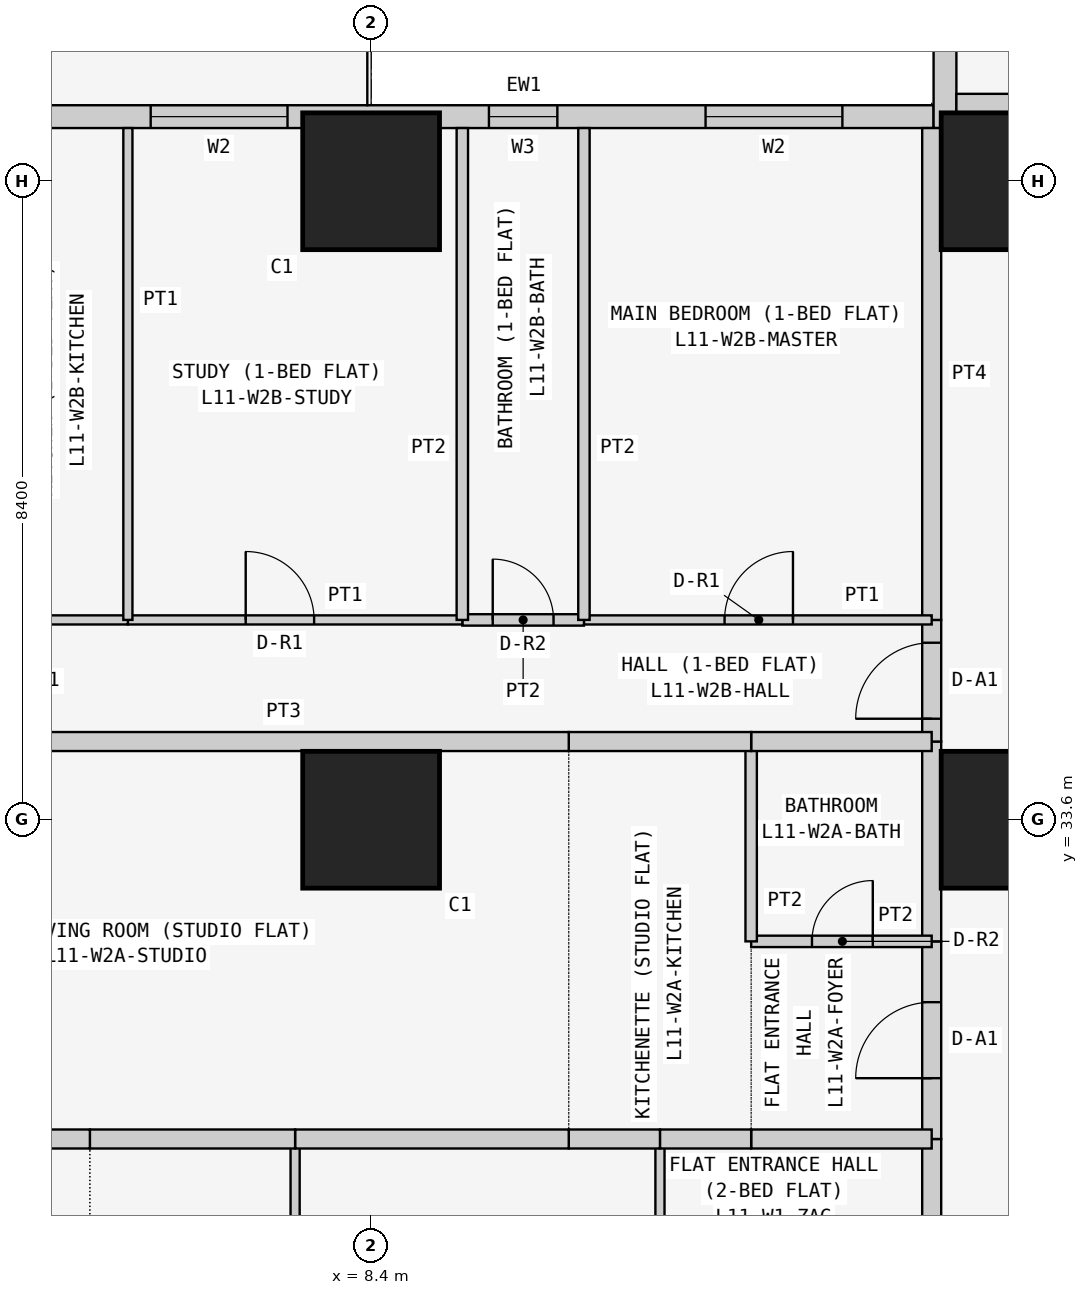
"""IFC4 building model, lengths in metres.
Left out: names, types, materials, properties, quantities, classifications, styles, units other than length and angle.
Written with IfcOpenShell. Run it as: python <this file> out.ifc"""

import sys

from ifc_helpers import new_model, si_unit, direction, frame, frame_2d, origin, origin_2d, place, context, subcontext, project, spatial, rectangle, extrude, element, fill, save


model = new_model("IFC4")
c1 = context("Model", 3, precision=1e-05, world=origin(), true_north=direction((0.0, 1.0)))
c2 = subcontext(c1, "Body", "Model", "MODEL_VIEW")
j1 = project(units=[si_unit("LENGTHUNIT", "METRE"), si_unit("PLANEANGLEUNIT", "RADIAN")], contexts=[c1])
p1 = place(None, origin())
s1 = spatial("IfcSite", under=j1, at=p1, CompositionType="ELEMENT")
p2 = place(p1, origin())
s2 = spatial("IfcBuilding", under=s1, at=p2, CompositionType="ELEMENT")
p3 = place(p2, frame((0.0, 0.0, 48.9)))
s3 = spatial("IfcBuildingStorey", under=s2, at=p3, CompositionType="ELEMENT", Elevation=48.9)
for number, where, z_axis, x_axis in (
    (1, (8.4, 33.6, 0.0), (0.0, 0.0, 1.0), (1.0, 0.0, 0.0)),
    (2, (8.4, 42.0, 0.0), (0.0, 0.0, 1.0), (1.0, 0.0, 0.0)),
    (3, (16.8, 33.6, 0.0), (0.0, 0.0, 1.0), (1.0, 0.0, 0.0)),
    (4, (16.8, 42.0, 0.0), (0.0, 0.0, 1.0), (1.0, 0.0, 0.0)),
):
    element("IfcColumn", number, at=place(p3, frame(where, z_axis=z_axis, x_axis=x_axis)), inside=s3, PredefinedType="COLUMN", context=c2, shape_type="SweptSolid", body=[
        extrude(rectangle(XDim=1.8, YDim=1.8, at=origin_2d()), origin(), (0.0, 0.0, 1.0), 3.6),
    ])
p4 = place(p3, frame((15.8, 42.85, 0.0), z_axis=(0.0, 0.0, 1.0), x_axis=(-1.0, 0.0, 0.0)))
e5 = element("IfcWall", 5, at=p4, inside=s3, PredefinedType="SOLIDWALL", context=c2, shape_type="SweptSolid", body=[
    extrude(rectangle(XDim=15.4, YDim=0.3, at=frame_2d((7.7, 0.0))), origin(), (0.0, 0.0, 1.0), 3.45),
])
p5 = place(p4, frame((1.2, 0.0, 0.9)))
e6 = element("IfcOpeningElement", 6, at=p5, cuts=e5, PredefinedType="OPENING", context=c2, shape_type="SweptSolid", body=[
    extrude(rectangle(XDim=1.8, YDim=1.5, at=frame_2d((0.9, 0.75))), frame((0.0, 0.16, 0.0), z_axis=(0.0, -1.0, 0.0), x_axis=(1.0, 0.0, 0.0)), (0.0, 0.0, 1.0), 0.32),
])
p6 = place(p4, frame((4.95, 0.0, 1.5)))
e7 = element("IfcOpeningElement", 7, at=p6, cuts=e5, PredefinedType="OPENING", context=c2, shape_type="SweptSolid", body=[
    extrude(rectangle(XDim=0.9, YDim=0.7, at=frame_2d((0.45, 0.35))), frame((0.0, 0.16, 0.0), z_axis=(0.0, -1.0, 0.0), x_axis=(1.0, 0.0, 0.0)), (0.0, 0.0, 1.0), 0.32),
])
p7 = place(p4, frame((8.5, 0.0, 0.9)))
e8 = element("IfcOpeningElement", 8, at=p7, cuts=e5, PredefinedType="OPENING", context=c2, shape_type="SweptSolid", body=[
    extrude(rectangle(XDim=1.8, YDim=1.5, at=frame_2d((0.9, 0.75))), frame((0.0, 0.16, 0.0), z_axis=(0.0, -1.0, 0.0), x_axis=(1.0, 0.0, 0.0)), (0.0, 0.0, 1.0), 0.32),
])
p8 = place(p4, frame((12.5, 0.0, 0.0)))
e9 = element("IfcOpeningElement", 9, at=p8, cuts=e5, PredefinedType="OPENING", context=c2, shape_type="SweptSolid", body=[
    extrude(rectangle(XDim=0.9, YDim=2.4, at=frame_2d((0.45, 1.2))), frame((0.0, 0.16, 0.0), z_axis=(0.0, -1.0, 0.0), x_axis=(1.0, 0.0, 0.0)), (0.0, 0.0, 1.0), 0.32),
])
p9 = place(p4, frame((13.5, 0.0, 0.9)))
e10 = element("IfcOpeningElement", 10, at=p9, cuts=e5, PredefinedType="OPENING", context=c2, shape_type="SweptSolid", body=[
    extrude(rectangle(XDim=1.2, YDim=1.5, at=frame_2d((0.6, 0.75))), frame((0.0, 0.16, 0.0), z_axis=(0.0, -1.0, 0.0), x_axis=(1.0, 0.0, 0.0)), (0.0, 0.0, 1.0), 0.32),
])
p10 = place(p3, frame((15.95, 58.4, 0.0), z_axis=(0.0, 0.0, 1.0), x_axis=(0.0, -1.0, 0.0)))
e11 = element("IfcWall", 11, at=p10, inside=s3, PredefinedType="SOLIDWALL", context=c2, shape_type="SweptSolid", body=[
    extrude(rectangle(XDim=15.7, YDim=0.3, at=frame_2d((7.85, 0.0))), origin(), (0.0, 0.0, 1.0), 3.45),
])
p11 = place(p10, frame((12.4, 0.0, 0.9)))
e12 = element("IfcOpeningElement", 12, at=p11, cuts=e11, PredefinedType="OPENING", context=c2, shape_type="SweptSolid", body=[
    extrude(rectangle(XDim=1.8, YDim=1.5, at=frame_2d((0.9, 0.75))), frame((0.0, 0.16, 0.0), z_axis=(0.0, -1.0, 0.0), x_axis=(1.0, 0.0, 0.0)), (0.0, 0.0, 1.0), 0.32),
])
p12 = place(p10, frame((9.55, 0.0, 1.5)))
e13 = element("IfcOpeningElement", 13, at=p12, cuts=e11, PredefinedType="OPENING", context=c2, shape_type="SweptSolid", body=[
    extrude(rectangle(XDim=0.9, YDim=0.7, at=frame_2d((0.45, 0.35))), frame((0.0, 0.16, 0.0), z_axis=(0.0, -1.0, 0.0), x_axis=(1.0, 0.0, 0.0)), (0.0, 0.0, 1.0), 0.32),
])
p13 = place(p10, frame((5.1, 0.0, 0.9)))
e14 = element("IfcOpeningElement", 14, at=p13, cuts=e11, PredefinedType="OPENING", context=c2, shape_type="SweptSolid", body=[
    extrude(rectangle(XDim=1.8, YDim=1.5, at=frame_2d((0.9, 0.75))), frame((0.0, 0.16, 0.0), z_axis=(0.0, -1.0, 0.0), x_axis=(1.0, 0.0, 0.0)), (0.0, 0.0, 1.0), 0.32),
])
p14 = place(p10, frame((2.0, 0.0, 0.0)))
e15 = element("IfcOpeningElement", 15, at=p14, cuts=e11, PredefinedType="OPENING", context=c2, shape_type="SweptSolid", body=[
    extrude(rectangle(XDim=0.9, YDim=2.4, at=frame_2d((0.45, 1.2))), frame((0.0, 0.16, 0.0), z_axis=(0.0, -1.0, 0.0), x_axis=(1.0, 0.0, 0.0)), (0.0, 0.0, 1.0), 0.32),
])
p15 = place(p10, frame((0.7, 0.0, 0.9)))
e16 = element("IfcOpeningElement", 16, at=p15, cuts=e11, PredefinedType="OPENING", context=c2, shape_type="SweptSolid", body=[
    extrude(rectangle(XDim=1.2, YDim=1.5, at=frame_2d((0.6, 0.75))), frame((0.0, 0.16, 0.0), z_axis=(0.0, -1.0, 0.0), x_axis=(1.0, 0.0, 0.0)), (0.0, 0.0, 1.0), 0.32),
])
p16 = place(p3, frame((16.1, 43.025, 0.0), z_axis=(0.0, 0.0, 1.0), x_axis=(1.0, 0.0, 0.0)))
e17 = element("IfcWall", 17, at=p16, inside=s3, PredefinedType="PARTITIONING", context=c2, shape_type="SweptSolid", body=[
    extrude(rectangle(XDim=6.871, YDim=0.25, at=frame_2d((3.436, 0.0))), origin(), (0.0, 0.0, 1.0), 3.45),
])
p17 = place(p3, frame((15.775, 24.171, 0.0), z_axis=(0.0, 0.0, 1.0), x_axis=(0.0, 1.0, 0.0)))
e18 = element("IfcWall", 18, at=p17, inside=s3, PredefinedType="PARTITIONING", context=c2, shape_type="SweptSolid", body=[
    extrude(rectangle(XDim=5.229, YDim=0.25, at=frame_2d((2.615, 0.0))), origin(), (0.0, 0.0, 1.0), 3.45),
])
p18 = place(p17, frame((2.129, 0.0, 0.0)))
e19 = element("IfcOpeningElement", 19, at=p18, cuts=e18, PredefinedType="OPENING", context=c2, shape_type="SweptSolid", body=[
    extrude(rectangle(XDim=1.0, YDim=2.1, at=frame_2d((0.5, 1.05))), frame((0.0, 0.135, 0.0), z_axis=(0.0, -1.0, 0.0), x_axis=(1.0, 0.0, 0.0)), (0.0, 0.0, 1.0), 0.27),
])
p19 = place(p3, frame((15.775, 29.4, 0.0), z_axis=(0.0, 0.0, 1.0), x_axis=(0.0, 1.0, 0.0)))
e20 = element("IfcWall", 20, at=p19, inside=s3, PredefinedType="PARTITIONING", context=c2, shape_type="SweptSolid", body=[
    extrude(rectangle(XDim=2.6, YDim=0.25, at=frame_2d((1.3, 0.0))), origin(), (0.0, 0.0, 1.0), 3.45),
])
p20 = place(p19, frame((0.8, 0.0, 0.0)))
e21 = element("IfcOpeningElement", 21, at=p20, cuts=e20, PredefinedType="OPENING", context=c2, shape_type="SweptSolid", body=[
    extrude(rectangle(XDim=1.0, YDim=2.1, at=frame_2d((0.5, 1.05))), frame((0.0, 0.135, 0.0), z_axis=(0.0, -1.0, 0.0), x_axis=(1.0, 0.0, 0.0)), (0.0, 0.0, 1.0), 0.27),
])
p21 = place(p3, frame((15.775, 32.0, 0.0), z_axis=(0.0, 0.0, 1.0), x_axis=(0.0, 1.0, 0.0)))
e22 = element("IfcWall", 22, at=p21, inside=s3, PredefinedType="PARTITIONING", context=c2, shape_type="SweptSolid", body=[
    extrude(rectangle(XDim=2.629, YDim=0.25, at=frame_2d((1.314, 0.0))), origin(), (0.0, 0.0, 1.0), 3.45),
])
p22 = place(p3, frame((15.775, 34.629, 0.0), z_axis=(0.0, 0.0, 1.0), x_axis=(0.0, 1.0, 0.0)))
e23 = element("IfcWall", 23, at=p22, inside=s3, PredefinedType="PARTITIONING", context=c2, shape_type="SweptSolid", body=[
    extrude(rectangle(XDim=1.6, YDim=0.25, at=frame_2d((0.8, 0.0))), origin(), (0.0, 0.0, 1.0), 3.45),
])
p23 = place(p22, frame((0.3, 0.0, 0.0)))
e24 = element("IfcOpeningElement", 24, at=p23, cuts=e23, PredefinedType="OPENING", context=c2, shape_type="SweptSolid", body=[
    extrude(rectangle(XDim=1.0, YDim=2.1, at=frame_2d((0.5, 1.05))), frame((0.0, 0.135, 0.0), z_axis=(0.0, -1.0, 0.0), x_axis=(1.0, 0.0, 0.0)), (0.0, 0.0, 1.0), 0.27),
])
p24 = place(p3, frame((15.775, 36.229, 0.0), z_axis=(0.0, 0.0, 1.0), x_axis=(0.0, 1.0, 0.0)))
e25 = element("IfcWall", 25, at=p24, inside=s3, PredefinedType="PARTITIONING", context=c2, shape_type="SweptSolid", body=[
    extrude(rectangle(XDim=6.471, YDim=0.25, at=frame_2d((3.235, 0.0))), origin(), (0.0, 0.0, 1.0), 3.45),
])
p25 = place(p3, frame((12.2, 29.4, 0.0), z_axis=(0.0, 0.0, 1.0), x_axis=(0.0, -1.0, 0.0)))
e26 = element("IfcWall", 26, at=p25, inside=s3, PredefinedType="PARTITIONING", context=c2, shape_type="SweptSolid", body=[
    extrude(rectangle(XDim=5.229, YDim=0.12, at=frame_2d((2.615, 0.0))), origin(), (0.0, 0.0, 1.0), 3.45),
])
p26 = place(p3, frame((15.775, 29.4, 0.0), z_axis=(0.0, 0.0, 1.0), x_axis=(-1.0, 0.0, 0.0)))
e27 = element("IfcWall", 27, at=p26, inside=s3, PredefinedType="PARTITIONING", context=c2, shape_type="SweptSolid", body=[
    extrude(rectangle(XDim=2.375, YDim=0.25, at=frame_2d((1.188, 0.0))), origin(), (0.0, 0.0, 1.0), 3.45),
])
p27 = place(p3, frame((13.4, 29.4, 0.0), z_axis=(0.0, 0.0, 1.0), x_axis=(-1.0, 0.0, 0.0)))
e28 = element("IfcWall", 28, at=p27, inside=s3, PredefinedType="PARTITIONING", context=c2, shape_type="SweptSolid", body=[
    extrude(rectangle(XDim=1.2, YDim=0.25, at=frame_2d((0.6, 0.0))), origin(), (0.0, 0.0, 1.0), 3.45),
])
p28 = place(p3, frame((7.4, 29.4, 0.0), z_axis=(0.0, 0.0, 1.0), x_axis=(0.0, -1.0, 0.0)))
e29 = element("IfcWall", 29, at=p28, inside=s3, PredefinedType="PARTITIONING", context=c2, shape_type="SweptSolid", body=[
    extrude(rectangle(XDim=5.229, YDim=0.12, at=frame_2d((2.615, 0.0))), origin(), (0.0, 0.0, 1.0), 3.45),
])
p29 = place(p3, frame((12.2, 29.4, 0.0), z_axis=(0.0, 0.0, 1.0), x_axis=(-1.0, 0.0, 0.0)))
e30 = element("IfcWall", 30, at=p29, inside=s3, PredefinedType="PARTITIONING", context=c2, shape_type="SweptSolid", body=[
    extrude(rectangle(XDim=1.2, YDim=0.25, at=frame_2d((0.6, 0.0))), origin(), (0.0, 0.0, 1.0), 3.45),
])
p30 = place(p3, frame((11.0, 29.4, 0.0), z_axis=(0.0, 0.0, 1.0), x_axis=(-1.0, 0.0, 0.0)))
e31 = element("IfcWall", 31, at=p30, inside=s3, PredefinedType="PARTITIONING", context=c2, shape_type="SweptSolid", body=[
    extrude(rectangle(XDim=3.6, YDim=0.25, at=frame_2d((1.8, 0.0))), origin(), (0.0, 0.0, 1.0), 3.45),
])
p31 = place(p3, frame((7.4, 29.4, 0.0), z_axis=(0.0, 0.0, 1.0), x_axis=(-1.0, 0.0, 0.0)))
e32 = element("IfcWall", 32, at=p31, inside=s3, PredefinedType="PARTITIONING", context=c2, shape_type="SweptSolid", body=[
    extrude(rectangle(XDim=2.7, YDim=0.25, at=frame_2d((1.35, 0.0))), origin(), (0.0, 0.0, 1.0), 3.45),
])
p32 = place(p3, frame((4.7, 29.4, 0.0), z_axis=(0.0, 0.0, 1.0), x_axis=(-1.0, 0.0, 0.0)))
e33 = element("IfcWall", 33, at=p32, inside=s3, PredefinedType="PARTITIONING", context=c2, shape_type="SweptSolid", body=[
    extrude(rectangle(XDim=5.35, YDim=0.25, at=frame_2d((2.675, 0.0))), origin(), (0.0, 0.0, 1.0), 3.45),
])
p33 = place(p3, frame((13.4, 32.0, 0.0), z_axis=(0.0, 0.0, 1.0), x_axis=(1.0, 0.0, 0.0)))
e34 = element("IfcWall", 34, at=p33, inside=s3, PredefinedType="PARTITIONING", context=c2, shape_type="SweptSolid", body=[
    extrude(rectangle(XDim=2.375, YDim=0.15, at=frame_2d((1.188, 0.0))), origin(), (0.0, 0.0, 1.0), 3.45),
])
p34 = place(p33, frame((0.8, 0.0, 0.0)))
e35 = element("IfcOpeningElement", 35, at=p34, cuts=e34, PredefinedType="OPENING", context=c2, shape_type="SweptSolid", body=[
    extrude(rectangle(XDim=0.8, YDim=2.1, at=frame_2d((0.4, 1.05))), frame((0.0, 0.085, 0.0), z_axis=(0.0, -1.0, 0.0), x_axis=(1.0, 0.0, 0.0)), (0.0, 0.0, 1.0), 0.17),
])
p35 = place(p3, frame((13.4, 32.0, 0.0), z_axis=(0.0, 0.0, 1.0), x_axis=(0.0, 1.0, 0.0)))
e36 = element("IfcWall", 36, at=p35, inside=s3, PredefinedType="PARTITIONING", context=c2, shape_type="SweptSolid", body=[
    extrude(rectangle(XDim=2.629, YDim=0.15, at=frame_2d((1.314, 0.0))), origin(), (0.0, 0.0, 1.0), 3.45),
])
p36 = place(p3, frame((13.4, 34.629, 0.0), z_axis=(0.0, 0.0, 1.0), x_axis=(1.0, 0.0, 0.0)))
e37 = element("IfcWall", 37, at=p36, inside=s3, PredefinedType="PARTITIONING", context=c2, shape_type="SweptSolid", body=[
    extrude(rectangle(XDim=2.375, YDim=0.25, at=frame_2d((1.188, 0.0))), origin(), (0.0, 0.0, 1.0), 3.45),
])
p37 = place(p3, frame((11.0, 34.629, 0.0), z_axis=(0.0, 0.0, 1.0), x_axis=(1.0, 0.0, 0.0)))
e38 = element("IfcWall", 38, at=p37, inside=s3, PredefinedType="PARTITIONING", context=c2, shape_type="SweptSolid", body=[
    extrude(rectangle(XDim=2.4, YDim=0.25, at=frame_2d((1.2, 0.0))), origin(), (0.0, 0.0, 1.0), 3.45),
])
p38 = place(p3, frame((3.5, 34.629, 0.0), z_axis=(0.0, 0.0, 1.0), x_axis=(1.0, 0.0, 0.0)))
e39 = element("IfcWall", 39, at=p38, inside=s3, PredefinedType="PARTITIONING", context=c2, shape_type="SweptSolid", body=[
    extrude(rectangle(XDim=7.5, YDim=0.25, at=frame_2d((3.75, 0.0))), origin(), (0.0, 0.0, 1.0), 3.45),
])
p39 = place(p3, frame((11.2, 36.229, 0.0), z_axis=(0.0, 0.0, 1.0), x_axis=(1.0, 0.0, 0.0)))
e40 = element("IfcWall", 40, at=p39, inside=s3, PredefinedType="PARTITIONING", context=c2, shape_type="SweptSolid", body=[
    extrude(rectangle(XDim=4.575, YDim=0.12, at=frame_2d((2.288, 0.0))), origin(), (0.0, 0.0, 1.0), 3.45),
])
p40 = place(p39, frame((1.85, 0.0, 0.0)))
e41 = element("IfcOpeningElement", 41, at=p40, cuts=e40, PredefinedType="OPENING", context=c2, shape_type="SweptSolid", body=[
    extrude(rectangle(XDim=0.9, YDim=2.1, at=frame_2d((0.45, 1.05))), frame((0.0, 0.07, 0.0), z_axis=(0.0, -1.0, 0.0), x_axis=(1.0, 0.0, 0.0)), (0.0, 0.0, 1.0), 0.14),
])
p41 = place(p3, frame((9.6, 36.229, 0.0), z_axis=(0.0, 0.0, 1.0), x_axis=(1.0, 0.0, 0.0)))
e42 = element("IfcWall", 42, at=p41, inside=s3, PredefinedType="PARTITIONING", context=c2, shape_type="SweptSolid", body=[
    extrude(rectangle(XDim=1.6, YDim=0.15, at=frame_2d((0.8, 0.0))), origin(), (0.0, 0.0, 1.0), 3.45),
])
p42 = place(p41, frame((0.4, 0.0, 0.0)))
e43 = element("IfcOpeningElement", 43, at=p42, cuts=e42, PredefinedType="OPENING", context=c2, shape_type="SweptSolid", body=[
    extrude(rectangle(XDim=0.8, YDim=2.1, at=frame_2d((0.4, 1.05))), frame((0.0, 0.085, 0.0), z_axis=(0.0, -1.0, 0.0), x_axis=(1.0, 0.0, 0.0)), (0.0, 0.0, 1.0), 0.17),
])
p43 = place(p3, frame((5.2, 36.229, 0.0), z_axis=(0.0, 0.0, 1.0), x_axis=(1.0, 0.0, 0.0)))
e44 = element("IfcWall", 44, at=p43, inside=s3, PredefinedType="PARTITIONING", context=c2, shape_type="SweptSolid", body=[
    extrude(rectangle(XDim=4.4, YDim=0.12, at=frame_2d((2.2, 0.0))), origin(), (0.0, 0.0, 1.0), 3.45),
])
p44 = place(p43, frame((1.55, 0.0, 0.0)))
e45 = element("IfcOpeningElement", 45, at=p44, cuts=e44, PredefinedType="OPENING", context=c2, shape_type="SweptSolid", body=[
    extrude(rectangle(XDim=0.9, YDim=2.1, at=frame_2d((0.45, 1.05))), frame((0.0, 0.07, 0.0), z_axis=(0.0, -1.0, 0.0), x_axis=(1.0, 0.0, 0.0)), (0.0, 0.0, 1.0), 0.14),
])
p45 = place(p3, frame((3.5, 36.229, 0.0), z_axis=(0.0, 0.0, 1.0), x_axis=(1.0, 0.0, 0.0)))
e46 = element("IfcWall", 46, at=p45, inside=s3, PredefinedType="PARTITIONING", context=c2, shape_type="SweptSolid", body=[
    extrude(rectangle(XDim=1.7, YDim=0.12, at=frame_2d((0.85, 0.0))), origin(), (0.0, 0.0, 1.0), 3.45),
])
for number, where, z_axis, x_axis in (
    (47, (11.2, 36.229, 0.0), (0.0, 0.0, 1.0), (0.0, 1.0, 0.0)),
    (48, (9.6, 36.229, 0.0), (0.0, 0.0, 1.0), (0.0, 1.0, 0.0)),
):
    element("IfcWall", number, at=place(p3, frame(where, z_axis=z_axis, x_axis=x_axis)), inside=s3, PredefinedType="PARTITIONING", context=c2, shape_type="SweptSolid", body=[
        extrude(rectangle(XDim=6.471, YDim=0.15, at=frame_2d((3.235, 0.0))), origin(), (0.0, 0.0, 1.0), 3.45),
    ])
p46 = place(p3, frame((5.2, 36.229, 0.0), z_axis=(0.0, 0.0, 1.0), x_axis=(0.0, 1.0, 0.0)))
e49 = element("IfcWall", 49, at=p46, inside=s3, PredefinedType="PARTITIONING", context=c2, shape_type="SweptSolid", body=[
    extrude(rectangle(XDim=6.471, YDim=0.12, at=frame_2d((3.235, 0.0))), origin(), (0.0, 0.0, 1.0), 3.45),
])
p47 = place(p5, origin())
e50 = element("IfcWindow", 50, at=p47, inside=s3, PartitioningType="SINGLE_PANEL", PredefinedType="WINDOW", context=c2, shape_type="SweptSolid", body=[
    extrude(rectangle(XDim=1.8, YDim=1.5, at=frame_2d((0.9, 0.75))), frame((0.0, 0.03, 0.0), z_axis=(0.0, -1.0, 0.0), x_axis=(1.0, 0.0, 0.0)), (0.0, 0.0, 1.0), 0.06),
])
fill(e6, e50)
p48 = place(p6, origin())
e51 = element("IfcWindow", 51, at=p48, inside=s3, PartitioningType="SINGLE_PANEL", PredefinedType="WINDOW", context=c2, shape_type="SweptSolid", body=[
    extrude(rectangle(XDim=0.9, YDim=0.7, at=frame_2d((0.45, 0.35))), frame((0.0, 0.03, 0.0), z_axis=(0.0, -1.0, 0.0), x_axis=(1.0, 0.0, 0.0)), (0.0, 0.0, 1.0), 0.06),
])
fill(e7, e51)
p49 = place(p7, origin())
e52 = element("IfcWindow", 52, at=p49, inside=s3, PartitioningType="SINGLE_PANEL", PredefinedType="WINDOW", context=c2, shape_type="SweptSolid", body=[
    extrude(rectangle(XDim=1.8, YDim=1.5, at=frame_2d((0.9, 0.75))), frame((0.0, 0.03, 0.0), z_axis=(0.0, -1.0, 0.0), x_axis=(1.0, 0.0, 0.0)), (0.0, 0.0, 1.0), 0.06),
])
fill(e8, e52)
p50 = place(p20, origin())
e53 = element("IfcDoor", 53, at=p50, inside=s3, OperationType="SINGLE_SWING_LEFT", PredefinedType="DOOR", context=c2, shape_type="SweptSolid", body=[
    extrude(rectangle(XDim=1.0, YDim=2.1, at=frame_2d((0.5, 1.05))), frame((0.0, 0.025, 0.0), z_axis=(0.0, -1.0, 0.0), x_axis=(1.0, 0.0, 0.0)), (0.0, 0.0, 1.0), 0.05),
])
fill(e21, e53)
p51 = place(p34, origin())
e54 = element("IfcDoor", 54, at=p51, inside=s3, OperationType="SINGLE_SWING_RIGHT", PredefinedType="DOOR", context=c2, shape_type="SweptSolid", body=[
    extrude(rectangle(XDim=0.8, YDim=2.1, at=frame_2d((0.4, 1.05))), frame((0.0, 0.025, 0.0), z_axis=(0.0, -1.0, 0.0), x_axis=(1.0, 0.0, 0.0)), (0.0, 0.0, 1.0), 0.05),
])
fill(e35, e54)
p52 = place(p23, origin())
e55 = element("IfcDoor", 55, at=p52, inside=s3, OperationType="SINGLE_SWING_LEFT", PredefinedType="DOOR", context=c2, shape_type="SweptSolid", body=[
    extrude(rectangle(XDim=1.0, YDim=2.1, at=frame_2d((0.5, 1.05))), frame((0.0, 0.025, 0.0), z_axis=(0.0, -1.0, 0.0), x_axis=(1.0, 0.0, 0.0)), (0.0, 0.0, 1.0), 0.05),
])
fill(e24, e55)
p53 = place(p40, origin())
e56 = element("IfcDoor", 56, at=p53, inside=s3, OperationType="SINGLE_SWING_RIGHT", PredefinedType="DOOR", context=c2, shape_type="SweptSolid", body=[
    extrude(rectangle(XDim=0.9, YDim=2.1, at=frame_2d((0.45, 1.05))), frame((0.0, 0.025, 0.0), z_axis=(0.0, -1.0, 0.0), x_axis=(1.0, 0.0, 0.0)), (0.0, 0.0, 1.0), 0.05),
])
fill(e41, e56)
p54 = place(p42, origin())
e57 = element("IfcDoor", 57, at=p54, inside=s3, OperationType="SINGLE_SWING_LEFT", PredefinedType="DOOR", context=c2, shape_type="SweptSolid", body=[
    extrude(rectangle(XDim=0.8, YDim=2.1, at=frame_2d((0.4, 1.05))), frame((0.0, 0.025, 0.0), z_axis=(0.0, -1.0, 0.0), x_axis=(1.0, 0.0, 0.0)), (0.0, 0.0, 1.0), 0.05),
])
fill(e43, e57)
p55 = place(p44, origin())
e58 = element("IfcDoor", 58, at=p55, inside=s3, OperationType="SINGLE_SWING_LEFT", PredefinedType="DOOR", context=c2, shape_type="SweptSolid", body=[
    extrude(rectangle(XDim=0.9, YDim=2.1, at=frame_2d((0.45, 1.05))), frame((0.0, 0.025, 0.0), z_axis=(0.0, -1.0, 0.0), x_axis=(1.0, 0.0, 0.0)), (0.0, 0.0, 1.0), 0.05),
])
fill(e45, e58)
save(model, sys.argv[1])
